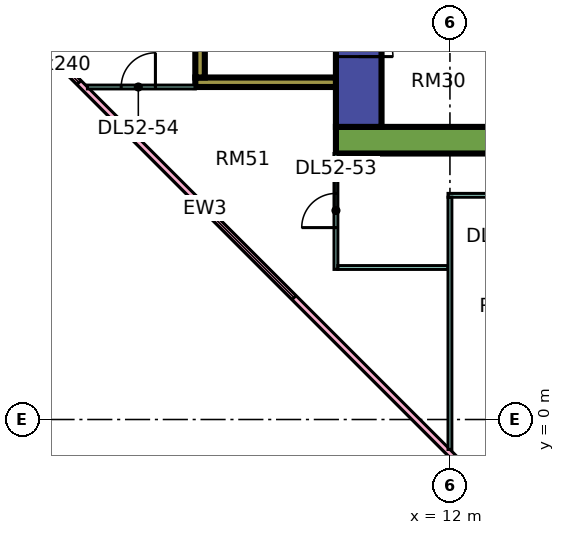
"""IFC4 building model, lengths in metres.
Left out: names, types, materials, properties, quantities, classifications, styles, units other than length and angle.
Written with IfcOpenShell. Run it as: python <this file> out.ifc"""

import sys

from ifc_helpers import new_model, si_unit, direction, frame, frame_2d, origin, place, context, subcontext, project, spatial, rectangle, extrude, element, fill, save


model = new_model("IFC4")
c1 = context("Model", 3, precision=1e-05, world=origin(), true_north=direction((0.0, 1.0)))
c2 = subcontext(c1, "Body", "Model", "MODEL_VIEW")
j1 = project(units=[si_unit("LENGTHUNIT", "METRE"), si_unit("PLANEANGLEUNIT", "RADIAN")], contexts=[c1])
p1 = place(None, origin())
s1 = spatial("IfcSite", under=j1, at=p1, CompositionType="ELEMENT")
p2 = place(p1, origin())
s2 = spatial("IfcBuilding", under=s1, at=p2, CompositionType="ELEMENT")
p3 = place(p2, frame((0.0, 0.0, 222.9)))
s3 = spatial("IfcBuildingStorey", under=s2, at=p3, CompositionType="ELEMENT", Elevation=222.9)
p4 = place(p3, frame((9.0, 7.35, 0.0), z_axis=(0.0, 0.0, 1.0), x_axis=(1.0, 0.0, 0.0)))
e1 = element("IfcWall", 1, at=p4, inside=s3, PredefinedType="SHEAR", context=c2, shape_type="SweptSolid", body=[
    extrude(rectangle(XDim=25.0, YDim=0.7, at=frame_2d((12.5, 0.0))), origin(), (0.0, 0.0, 1.0), 3.75),
])
p5 = place(p3, frame((9.6, 7.7, 0.0), z_axis=(0.0, 0.0, 1.0), x_axis=(0.0, 1.0, 0.0)))
e2 = element("IfcWall", 2, at=p5, inside=s3, PredefinedType="SHEAR", context=c2, shape_type="SweptSolid", body=[
    extrude(rectangle(XDim=11.6, YDim=1.2, at=frame_2d((5.8, 0.0))), origin(), (0.0, 0.0, 1.0), 3.75),
])
p6 = place(p5, frame((4.175, 0.0, 0.0)))
e3 = element("IfcOpeningElement", 3, at=p6, cuts=e2, PredefinedType="OPENING", context=c2, shape_type="SweptSolid", body=[
    extrude(rectangle(XDim=1.1, YDim=2.2, at=frame_2d((0.55, 1.1))), frame((0.0, 0.61, 0.0), z_axis=(0.0, -1.0, 0.0), x_axis=(1.0, 0.0, 0.0)), (0.0, 0.0, 1.0), 1.22),
])
p7 = place(p5, frame((6.675, 0.0, 0.0)))
e4 = element("IfcOpeningElement", 4, at=p7, cuts=e2, PredefinedType="OPENING", context=c2, shape_type="SweptSolid", body=[
    extrude(rectangle(XDim=1.1, YDim=2.2, at=frame_2d((0.55, 1.1))), frame((0.0, 0.61, 0.0), z_axis=(0.0, -1.0, 0.0), x_axis=(1.0, 0.0, 0.0)), (0.0, 0.0, 1.0), 1.22),
])
p8 = place(p5, frame((9.55, 0.0, 0.0)))
e5 = element("IfcOpeningElement", 5, at=p8, cuts=e2, PredefinedType="OPENING", context=c2, shape_type="SweptSolid", body=[
    extrude(rectangle(XDim=1.1, YDim=2.2, at=frame_2d((0.55, 1.1))), frame((0.0, 0.61, 0.0), z_axis=(0.0, -1.0, 0.0), x_axis=(1.0, 0.0, 0.0)), (0.0, 0.0, 1.0), 1.22),
])
p9 = place(p5, frame((1.85, 0.0, 0.0)))
e6 = element("IfcOpeningElement", 6, at=p9, cuts=e2, PredefinedType="OPENING", context=c2, shape_type="SweptSolid", body=[
    extrude(rectangle(XDim=0.9, YDim=2.1, at=frame_2d((0.45, 1.05))), frame((0.0, 0.61, 0.0), z_axis=(0.0, -1.0, 0.0), x_axis=(1.0, 0.0, 0.0)), (0.0, 0.0, 1.0), 1.22),
])
p10 = place(p3, frame((5.3, 8.875, 0.0), z_axis=(0.0, 0.0, 1.0), x_axis=(1.0, 0.0, 0.0)))
e7 = element("IfcWall", 7, at=p10, inside=s3, PredefinedType="SHEAR", context=c2, shape_type="SweptSolid", body=[
    extrude(rectangle(XDim=3.7, YDim=0.25, at=frame_2d((1.85, 0.0))), origin(), (0.0, 0.0, 1.0), 3.75),
])
p11 = place(p3, frame((5.425, 9.0, 0.0), z_axis=(0.0, 0.0, 1.0), x_axis=(0.0, 1.0, 0.0)))
e8 = element("IfcWall", 8, at=p11, inside=s3, PredefinedType="SHEAR", context=c2, shape_type="SweptSolid", body=[
    extrude(rectangle(XDim=4.0, YDim=0.25, at=frame_2d((2.0, 0.0))), origin(), (0.0, 0.0, 1.0), 3.75),
])
p12 = place(p3, frame((-1.447, 12.553, 0.0), z_axis=(0.0, 0.0, 1.0), x_axis=(0.707106781187, -0.707106781187, 0.0)))
e9 = element("IfcWall", 9, at=p12, inside=s3, PredefinedType="SOLIDWALL", context=c2, shape_type="SweptSolid", body=[
    extrude(rectangle(XDim=19.799, YDim=0.15, at=frame_2d((9.899, 0.0))), origin(), (0.0, 0.0, 1.0), 3.35),
])
p13 = place(p12, frame((2.212, 0.0, 0.45)))
e10 = element("IfcOpeningElement", 10, at=p13, cuts=e9, PredefinedType="OPENING", context=c2, shape_type="SweptSolid", body=[
    extrude(rectangle(XDim=3.0, YDim=2.4, at=frame_2d((1.5, 1.2))), frame((0.0, 0.085, 0.0), z_axis=(0.0, -1.0, 0.0), x_axis=(1.0, 0.0, 0.0)), (0.0, 0.0, 1.0), 0.17),
])
p14 = place(p12, frame((10.216, 0.0, 0.45)))
e11 = element("IfcOpeningElement", 11, at=p14, cuts=e9, PredefinedType="OPENING", context=c2, shape_type="SweptSolid", body=[
    extrude(rectangle(XDim=3.0, YDim=2.4, at=frame_2d((1.5, 1.2))), frame((0.0, 0.085, 0.0), z_axis=(0.0, -1.0, 0.0), x_axis=(1.0, 0.0, 0.0)), (0.0, 0.0, 1.0), 0.17),
])
p15 = place(p3, frame((2.461, 8.75, 0.0), z_axis=(0.0, 0.0, 1.0), x_axis=(1.0, 0.0, 0.0)))
e12 = element("IfcWall", 12, at=p15, inside=s3, PredefinedType="PARTITIONING", context=c2, shape_type="SweptSolid", body=[
    extrude(rectangle(XDim=2.839, YDim=0.1, at=frame_2d((1.419, 0.0))), origin(), (0.0, 0.0, 1.0), 3.35),
])
p16 = place(p15, frame((0.889, 0.0, 0.0)))
e13 = element("IfcOpeningElement", 13, at=p16, cuts=e12, PredefinedType="OPENING", context=c2, shape_type="SweptSolid", body=[
    extrude(rectangle(XDim=0.9, YDim=2.1, at=frame_2d((0.45, 1.05))), frame((0.0, 0.06, 0.0), z_axis=(0.0, -1.0, 0.0), x_axis=(1.0, 0.0, 0.0)), (0.0, 0.0, 1.0), 0.12),
])
p17 = place(p3, frame((9.0, 3.95, 0.0), z_axis=(0.0, 0.0, 1.0), x_axis=(0.0, 1.0, 0.0)))
e14 = element("IfcWall", 14, at=p17, inside=s3, PredefinedType="PARTITIONING", context=c2, shape_type="SweptSolid", body=[
    extrude(rectangle(XDim=3.05, YDim=0.1, at=frame_2d((1.525, 0.0))), origin(), (0.0, 0.0, 1.0), 3.35),
])
p18 = place(p17, frame((1.1, 0.0, 0.0)))
e15 = element("IfcOpeningElement", 15, at=p18, cuts=e14, PredefinedType="OPENING", context=c2, shape_type="SweptSolid", body=[
    extrude(rectangle(XDim=0.9, YDim=2.1, at=frame_2d((0.45, 1.05))), frame((0.0, 0.06, 0.0), z_axis=(0.0, -1.0, 0.0), x_axis=(1.0, 0.0, 0.0)), (0.0, 0.0, 1.0), 0.12),
])
p19 = place(p3, frame((9.05, 4.0, 0.0), z_axis=(0.0, 0.0, 1.0), x_axis=(1.0, 0.0, 0.0)))
e16 = element("IfcWall", 16, at=p19, inside=s3, PredefinedType="PARTITIONING", context=c2, shape_type="SweptSolid", body=[
    extrude(rectangle(XDim=2.9, YDim=0.1, at=frame_2d((1.45, 0.0))), origin(), (0.0, 0.0, 1.0), 3.35),
])
p20 = place(p3, frame((11.95, 5.9, 0.0), z_axis=(0.0, 0.0, 1.0), x_axis=(1.0, 0.0, 0.0)))
e17 = element("IfcWall", 17, at=p20, inside=s3, PredefinedType="PARTITIONING", context=c2, shape_type="SweptSolid", body=[
    extrude(rectangle(XDim=21.1, YDim=0.1, at=frame_2d((10.55, 0.0))), origin(), (0.0, 0.0, 1.0), 3.35),
])
p21 = place(p20, frame((1.1, 0.0, 0.0)))
e18 = element("IfcOpeningElement", 18, at=p21, cuts=e17, PredefinedType="OPENING", context=c2, shape_type="SweptSolid", body=[
    extrude(rectangle(XDim=0.9, YDim=2.1, at=frame_2d((0.45, 1.05))), frame((0.0, 0.06, 0.0), z_axis=(0.0, -1.0, 0.0), x_axis=(1.0, 0.0, 0.0)), (0.0, 0.0, 1.0), 0.12),
])
p22 = place(p20, frame((4.1, 0.0, 0.0)))
e19 = element("IfcOpeningElement", 19, at=p22, cuts=e17, PredefinedType="OPENING", context=c2, shape_type="SweptSolid", body=[
    extrude(rectangle(XDim=0.9, YDim=2.1, at=frame_2d((0.45, 1.05))), frame((0.0, 0.06, 0.0), z_axis=(0.0, -1.0, 0.0), x_axis=(1.0, 0.0, 0.0)), (0.0, 0.0, 1.0), 0.12),
])
p23 = place(p20, frame((7.1, 0.0, 0.0)))
e20 = element("IfcOpeningElement", 20, at=p23, cuts=e17, PredefinedType="OPENING", context=c2, shape_type="SweptSolid", body=[
    extrude(rectangle(XDim=0.9, YDim=2.1, at=frame_2d((0.45, 1.05))), frame((0.0, 0.06, 0.0), z_axis=(0.0, -1.0, 0.0), x_axis=(1.0, 0.0, 0.0)), (0.0, 0.0, 1.0), 0.12),
])
p24 = place(p20, frame((13.1, 0.0, 0.0)))
e21 = element("IfcOpeningElement", 21, at=p24, cuts=e17, PredefinedType="OPENING", context=c2, shape_type="SweptSolid", body=[
    extrude(rectangle(XDim=0.9, YDim=2.1, at=frame_2d((0.45, 1.05))), frame((0.0, 0.06, 0.0), z_axis=(0.0, -1.0, 0.0), x_axis=(1.0, 0.0, 0.0)), (0.0, 0.0, 1.0), 0.12),
])
p25 = place(p3, frame((12.0, -0.788, 0.0), z_axis=(0.0, 0.0, 1.0), x_axis=(0.0, 1.0, 0.0)))
e22 = element("IfcWall", 22, at=p25, inside=s3, PredefinedType="PARTITIONING", context=c2, shape_type="SweptSolid", body=[
    extrude(rectangle(XDim=6.638, YDim=0.1, at=frame_2d((3.319, 0.0))), origin(), (0.0, 0.0, 1.0), 3.35),
])
p26 = place(p13, origin())
e23 = element("IfcWindow", 23, at=p26, inside=s3, PartitioningType="SINGLE_PANEL", PredefinedType="WINDOW", context=c2, shape_type="SweptSolid", body=[
    extrude(rectangle(XDim=3.0, YDim=2.4, at=frame_2d((1.5, 1.2))), frame((0.0, 0.03, 0.0), z_axis=(0.0, -1.0, 0.0), x_axis=(1.0, 0.0, 0.0)), (0.0, 0.0, 1.0), 0.06),
])
fill(e10, e23)
p27 = place(p14, origin())
e24 = element("IfcWindow", 24, at=p27, inside=s3, PartitioningType="SINGLE_PANEL", PredefinedType="WINDOW", context=c2, shape_type="SweptSolid", body=[
    extrude(rectangle(XDim=3.0, YDim=2.4, at=frame_2d((1.5, 1.2))), frame((0.0, 0.03, 0.0), z_axis=(0.0, -1.0, 0.0), x_axis=(1.0, 0.0, 0.0)), (0.0, 0.0, 1.0), 0.06),
])
fill(e11, e24)
p28 = place(p9, frame((0.9, 0.0, 0.0), z_axis=(0.0, 0.0, 1.0), x_axis=(-1.0, 0.0, 0.0)))
e25 = element("IfcDoor", 25, at=p28, inside=s3, OperationType="SINGLE_SWING_LEFT", PredefinedType="DOOR", context=c2, shape_type="SweptSolid", body=[
    extrude(rectangle(XDim=0.9, YDim=2.1, at=frame_2d((0.45, 1.05))), frame((0.0, 0.025, 0.0), z_axis=(0.0, -1.0, 0.0), x_axis=(1.0, 0.0, 0.0)), (0.0, 0.0, 1.0), 0.05),
])
fill(e6, e25)
p29 = place(p18, origin())
e26 = element("IfcDoor", 26, at=p29, inside=s3, OperationType="SINGLE_SWING_LEFT", PredefinedType="DOOR", context=c2, shape_type="SweptSolid", body=[
    extrude(rectangle(XDim=0.9, YDim=2.1, at=frame_2d((0.45, 1.05))), frame((0.0, 0.025, 0.0), z_axis=(0.0, -1.0, 0.0), x_axis=(1.0, 0.0, 0.0)), (0.0, 0.0, 1.0), 0.05),
])
fill(e15, e26)
p30 = place(p16, frame((0.9, 0.0, 0.0), z_axis=(0.0, 0.0, 1.0), x_axis=(-1.0, 0.0, 0.0)))
e27 = element("IfcDoor", 27, at=p30, inside=s3, OperationType="SINGLE_SWING_RIGHT", PredefinedType="DOOR", context=c2, shape_type="SweptSolid", body=[
    extrude(rectangle(XDim=0.9, YDim=2.1, at=frame_2d((0.45, 1.05))), frame((0.0, 0.025, 0.0), z_axis=(0.0, -1.0, 0.0), x_axis=(1.0, 0.0, 0.0)), (0.0, 0.0, 1.0), 0.05),
])
fill(e13, e27)
save(model, sys.argv[1])
